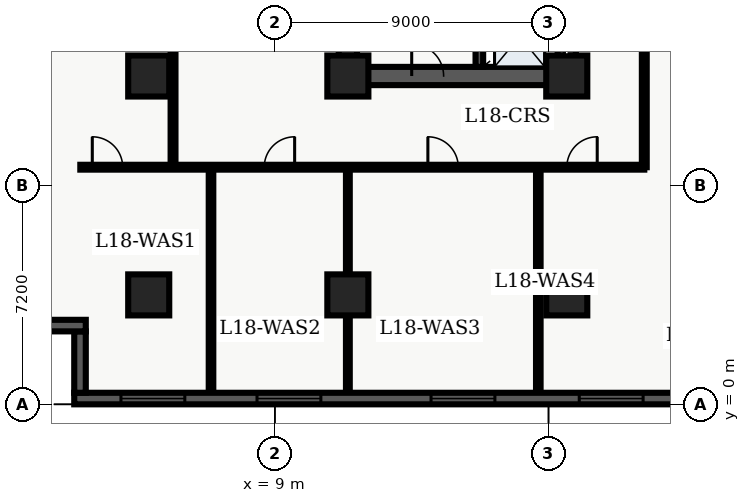
"""IFC4 building model, lengths in metres.
Left out: names, types, materials, properties, quantities, classifications, styles, units other than length and angle.
Written with IfcOpenShell. Run it as: python <this file> out.ifc"""

import sys

from ifc_helpers import new_model, entity, si_unit, converted_unit, direction, frame, origin_with_axes, origin_2d_with_axis, place, context, subcontext, project, spatial, polyline, rectangle, outline, extrude, element, fill, save


model = new_model("IFC4")
c1 = context("Model", 3, precision=1e-05, world=origin_with_axes(), true_north=direction((0.0, 1.0)))
c2 = subcontext(c1, "Body", "Model", "MODEL_VIEW")
j1 = project(units=[si_unit("LENGTHUNIT", "METRE"), converted_unit("PLANEANGLEUNIT", "DEGREE", entity("IfcPlaneAngleMeasure", 0.017), si_unit("PLANEANGLEUNIT", "RADIAN"), dimensions=[0, 0, 0, 0, 0, 0, 0])], contexts=[c1])
p1 = place(None, origin_with_axes())
s1 = spatial("IfcSite", under=j1, at=p1, CompositionType="ELEMENT")
p2 = place(p1, origin_with_axes())
s2 = spatial("IfcBuilding", under=s1, at=p2, CompositionType="ELEMENT")
p3 = place(p2, frame((0.0, 0.0, 75.6), z_axis=(0.0, 0.0, 1.0), x_axis=(1.0, 0.0, 0.0)))
s3 = spatial("IfcBuildingStorey", under=s2, at=p3, CompositionType="ELEMENT", Elevation=75.6)
p4 = place(p3, frame((11.4, 10.8, 0.0), z_axis=(0.0, 0.0, 1.0), x_axis=(0.0, 1.0, 0.0)))
e1 = element("IfcWall", 1, at=p4, inside=s3, PredefinedType="SHEAR", context=c2, shape_type="SweptSolid", body=[
    extrude(outline(polyline([(0.0, -0.3), (27.0, -0.3), (27.0, 0.3), (0.0, 0.3), (0.0, -0.3)])), origin_with_axes(), (0.0, 0.0, 1.0), 3.6),
])
p5 = place(p3, frame((11.4, 10.8, 0.0), z_axis=(0.0, 0.0, 1.0), x_axis=(1.0, 0.0, 0.0)))
e2 = element("IfcWall", 2, at=p5, inside=s3, PredefinedType="SHEAR", context=c2, shape_type="SweptSolid", body=[
    extrude(outline(polyline([(0.0, -0.3), (7.2, -0.3), (7.2, 0.3), (0.0, 0.3), (0.0, -0.3)])), origin_with_axes(), (0.0, 0.0, 1.0), 3.6),
])
p6 = place(p5, frame((2.625, 0.0, 0.0), z_axis=(0.0, 0.0, 1.0), x_axis=(1.0, 0.0, 0.0)))
e3 = element("IfcOpeningElement", 3, at=p6, cuts=e2, PredefinedType="OPENING", context=c2, shape_type="SweptSolid", body=[
    extrude(rectangle(XDim=1.05, YDim=0.62, at=origin_2d_with_axis()), origin_with_axes(), (0.0, 0.0, 1.0), 2.15),
])
p7 = place(p3, frame((18.6, 10.8, 0.0), z_axis=(0.0, 0.0, 1.0), x_axis=(0.0, 1.0, 0.0)))
e4 = element("IfcWall", 4, at=p7, inside=s3, PredefinedType="SHEAR", context=c2, shape_type="SweptSolid", body=[
    extrude(outline(polyline([(0.0, -0.3), (13.5, -0.3), (13.5, 0.3), (0.0, 0.3), (0.0, -0.3)])), origin_with_axes(), (0.0, 0.0, 1.0), 3.6),
])
p8 = place(p7, frame((1.3, 0.0, 0.0), z_axis=(0.0, 0.0, 1.0), x_axis=(1.0, 0.0, 0.0)))
e5 = element("IfcOpeningElement", 5, at=p8, cuts=e4, PredefinedType="OPENING", context=c2, shape_type="SweptSolid", body=[
    extrude(rectangle(XDim=1.1, YDim=0.62, at=origin_2d_with_axis()), origin_with_axes(), (0.0, 0.0, 1.0), 2.15),
])
p9 = place(p7, frame((3.4, 0.0, 0.0), z_axis=(0.0, 0.0, 1.0), x_axis=(1.0, 0.0, 0.0)))
e6 = element("IfcOpeningElement", 6, at=p9, cuts=e4, PredefinedType="OPENING", context=c2, shape_type="SweptSolid", body=[
    extrude(rectangle(XDim=1.1, YDim=0.62, at=origin_2d_with_axis()), origin_with_axes(), (0.0, 0.0, 1.0), 2.15),
])
p10 = place(p7, frame((11.125, 0.0, 0.0), z_axis=(0.0, 0.0, 1.0), x_axis=(1.0, 0.0, 0.0)))
e7 = element("IfcOpeningElement", 7, at=p10, cuts=e4, PredefinedType="OPENING", context=c2, shape_type="SweptSolid", body=[
    extrude(rectangle(XDim=1.05, YDim=0.62, at=origin_2d_with_axis()), origin_with_axes(), (0.0, 0.0, 1.0), 2.15),
])
p11 = place(p3, frame((15.725, 11.1, 0.0), z_axis=(0.0, 0.0, 1.0), x_axis=(0.0, 1.0, 0.0)))
e8 = element("IfcWall", 8, at=p11, inside=s3, PredefinedType="SHEAR", context=c2, shape_type="SweptSolid", body=[
    extrude(outline(polyline([(0.0, -0.125), (8.6, -0.125), (8.6, 0.125), (0.0, 0.125), (0.0, -0.125)])), origin_with_axes(), (0.0, 0.0, 1.0), 3.6),
])
for number, where, z_axis, x_axis in (
    (9, (11.4, 3.6, 0.0), (0.0, 0.0, 1.0), (1.0, 0.0, 0.0)),
    (10, (11.4, 10.8, 0.0), (0.0, 0.0, 1.0), (1.0, 0.0, 0.0)),
    (11, (18.6, 3.6, 0.0), (0.0, 0.0, 1.0), (1.0, 0.0, 0.0)),
    (12, (18.6, 10.8, 0.0), (0.0, 0.0, 1.0), (1.0, 0.0, 0.0)),
    (13, (4.85, 3.6, 0.0), (0.0, 0.0, 1.0), (1.0, 0.0, 0.0)),
    (14, (4.85, 10.8, 0.0), (0.0, 0.0, 1.0), (1.0, 0.0, 0.0)),
):
    element("IfcColumn", number, at=place(p3, frame(where, z_axis=z_axis, x_axis=x_axis)), inside=s3, PredefinedType="COLUMN", context=c2, shape_type="SweptSolid", body=[
        extrude(rectangle(XDim=1.35, YDim=1.35, at=origin_2d_with_axis()), origin_with_axes(), (0.0, 0.0, 1.0), 3.9),
    ])
p12 = place(p3, frame((2.6, 7.8, 0.0), z_axis=(0.0, 0.0, 1.0), x_axis=(1.0, 0.0, 0.0)))
e15 = element("IfcWall", 15, at=p12, inside=s3, PredefinedType="PARTITIONING", context=c2, shape_type="SweptSolid", body=[
    extrude(outline(polyline([(0.0, -0.08), (18.55, -0.08), (18.55, 0.08), (0.0, 0.08), (0.0, -0.08)])), origin_with_axes(), (0.0, 0.0, 1.0), 2.64),
])
p13 = place(p12, frame((0.894, 0.0, 0.0), z_axis=(0.0, 0.0, 1.0), x_axis=(1.0, 0.0, 0.0)))
e16 = element("IfcOpeningElement", 16, at=p13, cuts=e15, PredefinedType="OPENING", context=c2, shape_type="SweptSolid", body=[
    extrude(rectangle(XDim=1.0, YDim=0.18, at=origin_2d_with_axis()), origin_with_axes(), (0.0, 0.0, 1.0), 2.15),
])
p14 = place(p12, frame((6.55, 0.0, 0.0), z_axis=(0.0, 0.0, 1.0), x_axis=(1.0, 0.0, 0.0)))
e17 = element("IfcOpeningElement", 17, at=p14, cuts=e15, PredefinedType="OPENING", context=c2, shape_type="SweptSolid", body=[
    extrude(rectangle(XDim=1.0, YDim=0.18, at=origin_2d_with_axis()), origin_with_axes(), (0.0, 0.0, 1.0), 2.15),
])
p15 = place(p12, frame((11.932, 0.0, 0.0), z_axis=(0.0, 0.0, 1.0), x_axis=(1.0, 0.0, 0.0)))
e18 = element("IfcOpeningElement", 18, at=p15, cuts=e15, PredefinedType="OPENING", context=c2, shape_type="SweptSolid", body=[
    extrude(rectangle(XDim=1.0, YDim=0.18, at=origin_2d_with_axis()), origin_with_axes(), (0.0, 0.0, 1.0), 2.15),
])
p16 = place(p12, frame((16.502, 0.0, 0.0), z_axis=(0.0, 0.0, 1.0), x_axis=(1.0, 0.0, 0.0)))
e19 = element("IfcOpeningElement", 19, at=p16, cuts=e15, PredefinedType="OPENING", context=c2, shape_type="SweptSolid", body=[
    extrude(rectangle(XDim=1.0, YDim=0.18, at=origin_2d_with_axis()), origin_with_axes(), (0.0, 0.0, 1.0), 2.15),
])
p17 = place(p3, frame((21.15, 7.8, 0.0), z_axis=(0.0, 0.0, 1.0), x_axis=(0.0, 1.0, 0.0)))
e20 = element("IfcWall", 20, at=p17, inside=s3, PredefinedType="PARTITIONING", context=c2, shape_type="SweptSolid", body=[
    extrude(outline(polyline([(0.0, -0.08), (32.7, -0.08), (32.7, 0.08), (0.0, 0.08), (0.0, -0.08)])), origin_with_axes(), (0.0, 0.0, 1.0), 2.64),
])
p18 = place(p17, frame((6.675, 0.0, 0.0), z_axis=(0.0, 0.0, 1.0), x_axis=(1.0, 0.0, 0.0)))
e21 = element("IfcOpeningElement", 21, at=p18, cuts=e20, PredefinedType="OPENING", context=c2, shape_type="SweptSolid", body=[
    extrude(rectangle(XDim=1.05, YDim=0.18, at=origin_2d_with_axis()), origin_with_axes(), (0.0, 0.0, 1.0), 2.15),
])
p19 = place(p3, frame((5.65, 7.8, 0.0), z_axis=(0.0, 0.0, 1.0), x_axis=(0.0, 1.0, 0.0)))
e22 = element("IfcWall", 22, at=p19, inside=s3, PredefinedType="PARTITIONING", context=c2, shape_type="SweptSolid", body=[
    extrude(outline(polyline([(0.0, -0.08), (32.7, -0.08), (32.7, 0.08), (0.0, 0.08), (0.0, -0.08)])), origin_with_axes(), (0.0, 0.0, 1.0), 2.64),
])
p20 = place(p19, frame((4.537, 0.0, 0.0), z_axis=(0.0, 0.0, 1.0), x_axis=(1.0, 0.0, 0.0)))
e23 = element("IfcOpeningElement", 23, at=p20, cuts=e22, PredefinedType="OPENING", context=c2, shape_type="SweptSolid", body=[
    extrude(rectangle(XDim=1.0, YDim=0.18, at=origin_2d_with_axis()), origin_with_axes(), (0.0, 0.0, 1.0), 2.15),
])
p21 = place(p19, frame((13.551, 0.0, 0.0), z_axis=(0.0, 0.0, 1.0), x_axis=(1.0, 0.0, 0.0)))
e24 = element("IfcOpeningElement", 24, at=p21, cuts=e22, PredefinedType="OPENING", context=c2, shape_type="SweptSolid", body=[
    extrude(rectangle(XDim=1.0, YDim=0.18, at=origin_2d_with_axis()), origin_with_axes(), (0.0, 0.0, 1.0), 2.15),
])
p22 = place(p19, frame((25.643, 0.0, 0.0), z_axis=(0.0, 0.0, 1.0), x_axis=(1.0, 0.0, 0.0)))
e25 = element("IfcOpeningElement", 25, at=p22, cuts=e22, PredefinedType="OPENING", context=c2, shape_type="SweptSolid", body=[
    extrude(rectangle(XDim=1.0, YDim=0.18, at=origin_2d_with_axis()), origin_with_axes(), (0.0, 0.0, 1.0), 2.15),
])
p23 = place(p3, frame((6.899, 0.36, 0.0), z_axis=(0.0, 0.0, 1.0), x_axis=(0.0, 1.0, 0.0)))
e26 = element("IfcWall", 26, at=p23, inside=s3, PredefinedType="PARTITIONING", context=c2, shape_type="SweptSolid", body=[
    extrude(outline(polyline([(0.0, -0.075), (7.34, -0.075), (7.34, 0.075), (0.0, 0.075), (0.0, -0.075)])), origin_with_axes(), (0.0, 0.0, 1.0), 2.64),
])
p24 = place(p3, frame((11.4, 0.36, 0.0), z_axis=(0.0, 0.0, 1.0), x_axis=(0.0, 1.0, 0.0)))
e27 = element("IfcWall", 27, at=p24, inside=s3, PredefinedType="PARTITIONING", context=c2, shape_type="SweptSolid", body=[
    extrude(outline(polyline([(0.0, -0.062), (7.34, -0.062), (7.34, 0.062), (0.0, 0.062), (0.0, -0.062)])), origin_with_axes(), (0.0, 0.0, 1.0), 2.64),
])
p25 = place(p3, frame((17.664, 0.36, 0.0), z_axis=(0.0, 0.0, 1.0), x_axis=(0.0, 1.0, 0.0)))
e28 = element("IfcWall", 28, at=p25, inside=s3, PredefinedType="PARTITIONING", context=c2, shape_type="SweptSolid", body=[
    extrude(outline(polyline([(0.0, -0.075), (7.34, -0.075), (7.34, 0.075), (0.0, 0.075), (0.0, -0.075)])), origin_with_axes(), (0.0, 0.0, 1.0), 2.64),
])
p26 = place(p3, frame((57.22, 0.19, 0.0), z_axis=(0.0, 0.0, 1.0), x_axis=(-1.0, 0.0, 0.0)))
e29 = element("IfcWall", 29, at=p26, inside=s3, PredefinedType="SOLIDWALL", context=c2, shape_type="SweptSolid", body=[
    extrude(outline(polyline([(0.0, -0.19), (54.82, -0.19), (54.82, 0.19), (0.0, 0.19), (0.0, -0.19)])), origin_with_axes(), (0.0, 0.0, 1.0), 3.6),
])
p27 = place(p26, frame((3.037, 0.0, 0.45), z_axis=(0.0, 0.0, 1.0), x_axis=(1.0, 0.0, 0.0)))
e30 = element("IfcOpeningElement", 30, at=p27, cuts=e29, PredefinedType="OPENING", context=c2, shape_type="SweptSolid", body=[
    extrude(rectangle(XDim=2.1, YDim=0.4, at=origin_2d_with_axis()), origin_with_axes(), (0.0, 0.0, 1.0), 2.2),
])
p28 = place(p26, frame((7.912, 0.0, 0.45), z_axis=(0.0, 0.0, 1.0), x_axis=(1.0, 0.0, 0.0)))
e31 = element("IfcOpeningElement", 31, at=p28, cuts=e29, PredefinedType="OPENING", context=c2, shape_type="SweptSolid", body=[
    extrude(rectangle(XDim=2.1, YDim=0.4, at=origin_2d_with_axis()), origin_with_axes(), (0.0, 0.0, 1.0), 2.2),
])
p29 = place(p26, frame((12.786, 0.0, 0.45), z_axis=(0.0, 0.0, 1.0), x_axis=(1.0, 0.0, 0.0)))
e32 = element("IfcOpeningElement", 32, at=p29, cuts=e29, PredefinedType="OPENING", context=c2, shape_type="SweptSolid", body=[
    extrude(rectangle(XDim=2.1, YDim=0.4, at=origin_2d_with_axis()), origin_with_axes(), (0.0, 0.0, 1.0), 2.2),
])
p30 = place(p26, frame((17.661, 0.0, 0.45), z_axis=(0.0, 0.0, 1.0), x_axis=(1.0, 0.0, 0.0)))
e33 = element("IfcOpeningElement", 33, at=p30, cuts=e29, PredefinedType="OPENING", context=c2, shape_type="SweptSolid", body=[
    extrude(rectangle(XDim=2.1, YDim=0.4, at=origin_2d_with_axis()), origin_with_axes(), (0.0, 0.0, 1.0), 2.2),
])
p31 = place(p26, frame((22.535, 0.0, 0.45), z_axis=(0.0, 0.0, 1.0), x_axis=(1.0, 0.0, 0.0)))
e34 = element("IfcOpeningElement", 34, at=p31, cuts=e29, PredefinedType="OPENING", context=c2, shape_type="SweptSolid", body=[
    extrude(rectangle(XDim=2.1, YDim=0.4, at=origin_2d_with_axis()), origin_with_axes(), (0.0, 0.0, 1.0), 2.2),
])
p32 = place(p26, frame((27.41, 0.0, 0.45), z_axis=(0.0, 0.0, 1.0), x_axis=(1.0, 0.0, 0.0)))
e35 = element("IfcOpeningElement", 35, at=p32, cuts=e29, PredefinedType="OPENING", context=c2, shape_type="SweptSolid", body=[
    extrude(rectangle(XDim=2.1, YDim=0.4, at=origin_2d_with_axis()), origin_with_axes(), (0.0, 0.0, 1.0), 2.2),
])
p33 = place(p26, frame((32.285, 0.0, 0.45), z_axis=(0.0, 0.0, 1.0), x_axis=(1.0, 0.0, 0.0)))
e36 = element("IfcOpeningElement", 36, at=p33, cuts=e29, PredefinedType="OPENING", context=c2, shape_type="SweptSolid", body=[
    extrude(rectangle(XDim=2.1, YDim=0.4, at=origin_2d_with_axis()), origin_with_axes(), (0.0, 0.0, 1.0), 2.2),
])
p34 = place(p26, frame((37.159, 0.0, 0.45), z_axis=(0.0, 0.0, 1.0), x_axis=(1.0, 0.0, 0.0)))
e37 = element("IfcOpeningElement", 37, at=p34, cuts=e29, PredefinedType="OPENING", context=c2, shape_type="SweptSolid", body=[
    extrude(rectangle(XDim=2.1, YDim=0.4, at=origin_2d_with_axis()), origin_with_axes(), (0.0, 0.0, 1.0), 2.2),
])
p35 = place(p26, frame((42.034, 0.0, 0.45), z_axis=(0.0, 0.0, 1.0), x_axis=(1.0, 0.0, 0.0)))
e38 = element("IfcOpeningElement", 38, at=p35, cuts=e29, PredefinedType="OPENING", context=c2, shape_type="SweptSolid", body=[
    extrude(rectangle(XDim=2.1, YDim=0.4, at=origin_2d_with_axis()), origin_with_axes(), (0.0, 0.0, 1.0), 2.2),
])
p36 = place(p26, frame((47.758, 0.0, 0.45), z_axis=(0.0, 0.0, 1.0), x_axis=(1.0, 0.0, 0.0)))
e39 = element("IfcOpeningElement", 39, at=p36, cuts=e29, PredefinedType="OPENING", context=c2, shape_type="SweptSolid", body=[
    extrude(rectangle(XDim=2.1, YDim=0.4, at=origin_2d_with_axis()), origin_with_axes(), (0.0, 0.0, 1.0), 2.2),
])
p37 = place(p26, frame((52.233, 0.0, 0.45), z_axis=(0.0, 0.0, 1.0), x_axis=(1.0, 0.0, 0.0)))
e40 = element("IfcOpeningElement", 40, at=p37, cuts=e29, PredefinedType="OPENING", context=c2, shape_type="SweptSolid", body=[
    extrude(rectangle(XDim=2.1, YDim=0.4, at=origin_2d_with_axis()), origin_with_axes(), (0.0, 0.0, 1.0), 2.2),
])
p38 = place(p3, frame((2.59, 0.38, 0.0), z_axis=(0.0, 0.0, 1.0), x_axis=(0.0, 1.0, 0.0)))
e41 = element("IfcWall", 41, at=p38, inside=s3, PredefinedType="SOLIDWALL", context=c2, shape_type="SweptSolid", body=[
    extrude(outline(polyline([(0.0, -0.19), (2.02, -0.19), (2.02, 0.19), (0.0, 0.19), (0.0, -0.19)])), origin_with_axes(), (0.0, 0.0, 1.0), 3.6),
])
p39 = place(p3, frame((2.78, 2.59, 0.0), z_axis=(0.0, 0.0, 1.0), x_axis=(-1.0, 0.0, 0.0)))
e42 = element("IfcWall", 42, at=p39, inside=s3, PredefinedType="SOLIDWALL", context=c2, shape_type="SweptSolid", body=[
    extrude(outline(polyline([(0.0, -0.19), (2.78, -0.19), (2.78, 0.19), (0.0, 0.19), (0.0, -0.19)])), origin_with_axes(), (0.0, 0.0, 1.0), 3.6),
])
p40 = place(p7, frame((1.3, 0.0, 0.0), z_axis=(0.0, 0.0, 1.0), x_axis=(1.0, 0.0, 0.0)))
e43 = element("IfcDoor", 43, at=p40, inside=s3, OperationType="SLIDING_TO_LEFT", PredefinedType="DOOR", context=c2, shape_type="SweptSolid", body=[
    extrude(rectangle(XDim=1.1, YDim=0.09, at=origin_2d_with_axis()), origin_with_axes(), (0.0, 0.0, 1.0), 2.15),
])
fill(e5, e43)
p41 = place(p5, frame((2.625, 0.0, 0.0), z_axis=(0.0, 0.0, 1.0), x_axis=(1.0, 0.0, 0.0)))
e44 = element("IfcDoor", 44, at=p41, inside=s3, OperationType="SINGLE_SWING_LEFT", PredefinedType="DOOR", context=c2, shape_type="SweptSolid", body=[
    extrude(rectangle(XDim=1.05, YDim=0.09, at=origin_2d_with_axis()), origin_with_axes(), (0.0, 0.0, 1.0), 2.15),
])
fill(e3, e44)
p42 = place(p12, frame((0.894, 0.0, 0.0), z_axis=(0.0, 0.0, 1.0), x_axis=(1.0, 0.0, 0.0)))
e45 = element("IfcDoor", 45, at=p42, inside=s3, OperationType="SINGLE_SWING_LEFT", PredefinedType="DOOR", context=c2, shape_type="SweptSolid", body=[
    extrude(rectangle(XDim=1.0, YDim=0.09, at=origin_2d_with_axis()), origin_with_axes(), (0.0, 0.0, 1.0), 2.15),
])
fill(e16, e45)
p43 = place(p12, frame((6.55, 0.0, 0.0), z_axis=(0.0, 0.0, 1.0), x_axis=(1.0, 0.0, 0.0)))
e46 = element("IfcDoor", 46, at=p43, inside=s3, OperationType="SINGLE_SWING_RIGHT", PredefinedType="DOOR", context=c2, shape_type="SweptSolid", body=[
    extrude(rectangle(XDim=1.0, YDim=0.09, at=origin_2d_with_axis()), origin_with_axes(), (0.0, 0.0, 1.0), 2.15),
])
fill(e17, e46)
p44 = place(p12, frame((11.932, 0.0, 0.0), z_axis=(0.0, 0.0, 1.0), x_axis=(1.0, 0.0, 0.0)))
e47 = element("IfcDoor", 47, at=p44, inside=s3, OperationType="SINGLE_SWING_LEFT", PredefinedType="DOOR", context=c2, shape_type="SweptSolid", body=[
    extrude(rectangle(XDim=1.0, YDim=0.09, at=origin_2d_with_axis()), origin_with_axes(), (0.0, 0.0, 1.0), 2.15),
])
fill(e18, e47)
p45 = place(p12, frame((16.502, 0.0, 0.0), z_axis=(0.0, 0.0, 1.0), x_axis=(1.0, 0.0, 0.0)))
e48 = element("IfcDoor", 48, at=p45, inside=s3, OperationType="SINGLE_SWING_RIGHT", PredefinedType="DOOR", context=c2, shape_type="SweptSolid", body=[
    extrude(rectangle(XDim=1.0, YDim=0.09, at=origin_2d_with_axis()), origin_with_axes(), (0.0, 0.0, 1.0), 2.15),
])
fill(e19, e48)
p46 = place(p26, frame((37.159, 0.0, 0.45), z_axis=(0.0, 0.0, 1.0), x_axis=(1.0, 0.0, 0.0)))
e49 = element("IfcWindow", 49, at=p46, inside=s3, PredefinedType="WINDOW", context=c2, shape_type="SweptSolid", body=[
    extrude(rectangle(XDim=2.1, YDim=0.09, at=origin_2d_with_axis()), origin_with_axes(), (0.0, 0.0, 1.0), 2.2),
])
fill(e37, e49)
p47 = place(p26, frame((42.034, 0.0, 0.45), z_axis=(0.0, 0.0, 1.0), x_axis=(1.0, 0.0, 0.0)))
e50 = element("IfcWindow", 50, at=p47, inside=s3, PredefinedType="WINDOW", context=c2, shape_type="SweptSolid", body=[
    extrude(rectangle(XDim=2.1, YDim=0.09, at=origin_2d_with_axis()), origin_with_axes(), (0.0, 0.0, 1.0), 2.2),
])
fill(e38, e50)
p48 = place(p26, frame((47.758, 0.0, 0.45), z_axis=(0.0, 0.0, 1.0), x_axis=(1.0, 0.0, 0.0)))
e51 = element("IfcWindow", 51, at=p48, inside=s3, PredefinedType="WINDOW", context=c2, shape_type="SweptSolid", body=[
    extrude(rectangle(XDim=2.1, YDim=0.09, at=origin_2d_with_axis()), origin_with_axes(), (0.0, 0.0, 1.0), 2.2),
])
fill(e39, e51)
p49 = place(p26, frame((52.233, 0.0, 0.45), z_axis=(0.0, 0.0, 1.0), x_axis=(1.0, 0.0, 0.0)))
e52 = element("IfcWindow", 52, at=p49, inside=s3, PredefinedType="WINDOW", context=c2, shape_type="SweptSolid", body=[
    extrude(rectangle(XDim=2.1, YDim=0.09, at=origin_2d_with_axis()), origin_with_axes(), (0.0, 0.0, 1.0), 2.2),
])
fill(e40, e52)
save(model, sys.argv[1])
